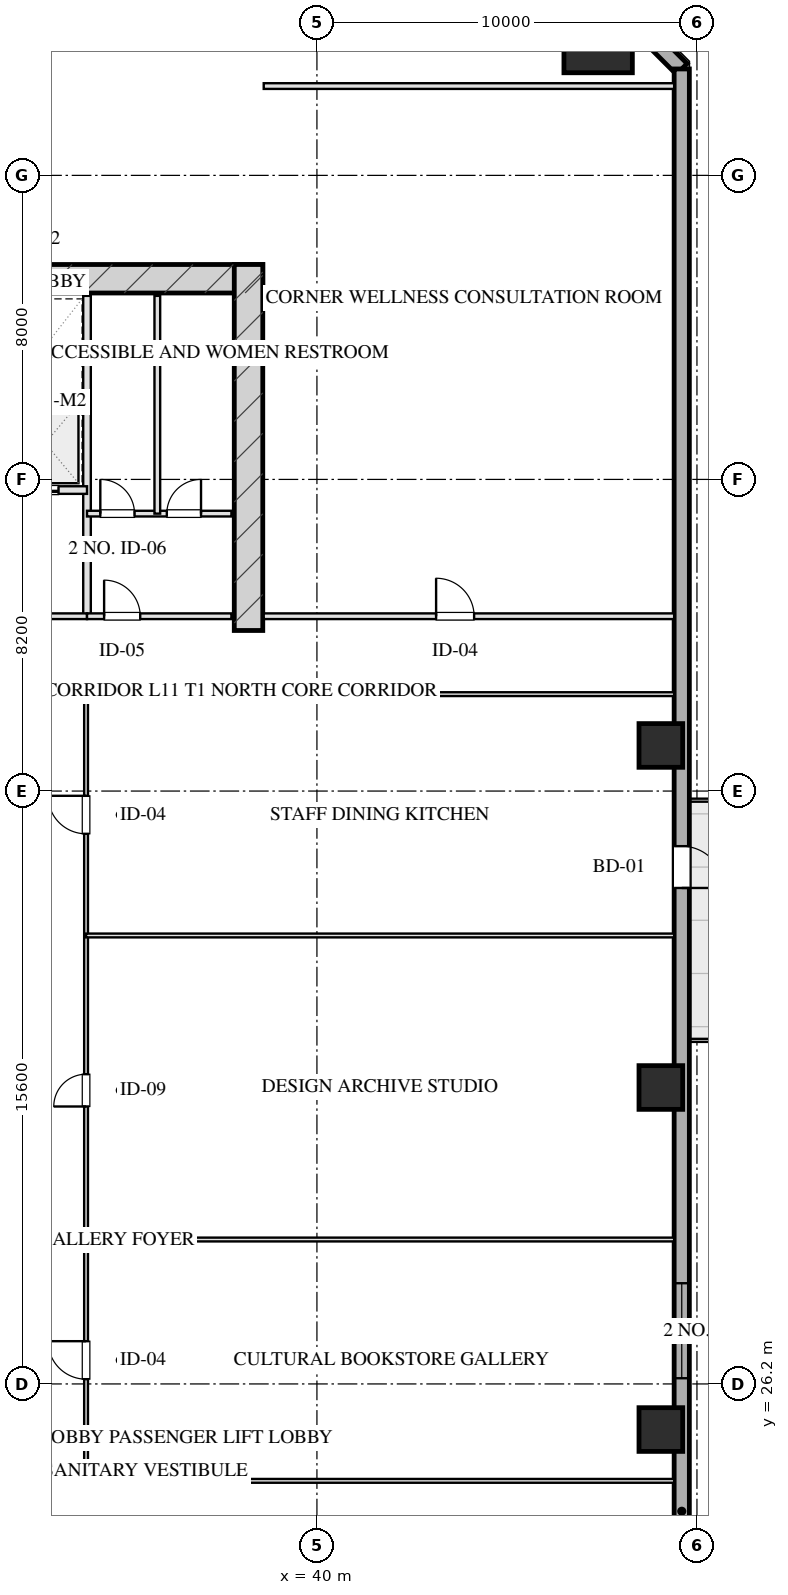
"""IFC4 building model, lengths in metres.
Left out: names, types, materials, properties, quantities, classifications, styles, units other than length and angle.
Written with IfcOpenShell. Run it as: python <this file> out.ifc"""

import sys

from ifc_helpers import new_model, si_unit, direction, frame, frame_2d, origin, origin_2d, place, context, subcontext, project, spatial, rectangle, hollow_rectangle, extrude, element, fill, save


model = new_model("IFC4")
c1 = context("Model", 3, precision=1e-05, world=origin(), true_north=direction((0.0, 1.0)))
c2 = subcontext(c1, "Body", "Model", "MODEL_VIEW")
j1 = project(units=[si_unit("LENGTHUNIT", "METRE"), si_unit("PLANEANGLEUNIT", "RADIAN")], contexts=[c1])
p1 = place(None, origin())
s1 = spatial("IfcSite", under=j1, at=p1, CompositionType="ELEMENT")
p2 = place(p1, origin())
s2 = spatial("IfcBuilding", under=s1, at=p2, CompositionType="ELEMENT")
p3 = place(p2, frame((0.0, 0.0, 50.6)))
s3 = spatial("IfcBuildingStorey", under=s2, at=p3, CompositionType="ELEMENT", Elevation=50.6)
p4 = place(p3, frame((21.425, 55.28, 0.0), z_axis=(0.0, 0.0, 1.0), x_axis=(1.0, 0.0, 0.0)))
e1 = element("IfcWall", 1, at=p4, inside=s3, PredefinedType="SHEAR", context=c2, shape_type="SweptSolid", body=[
    extrude(rectangle(XDim=17.15, YDim=0.75, at=frame_2d((8.575, 0.0))), origin(), (0.0, 0.0, 1.0), 3.45),
])
p5 = place(p3, frame((38.2, 46.025, 0.0), z_axis=(0.0, 0.0, 1.0), x_axis=(0.0, 1.0, 0.0)))
e2 = element("IfcWall", 2, at=p5, inside=s3, PredefinedType="SHEAR", context=c2, shape_type="SweptSolid", body=[
    extrude(rectangle(XDim=9.63, YDim=0.75, at=frame_2d((4.815, 0.0))), origin(), (0.0, 0.0, 1.0), 3.45),
])
p6 = place(p3, frame((47.4, 61.6, 0.0), z_axis=(0.0, 0.0, 1.0), x_axis=(1.0, 0.0, 0.0)))
e3 = element("IfcColumn", 3, at=p6, inside=s3, PredefinedType="COLUMN", context=c2, shape_type="SweptSolid", body=[
    extrude(hollow_rectangle(XDim=1.8, YDim=1.8, WallThickness=0.06, at=origin_2d()), origin(), (0.0, 0.0, 1.0), 3.451),
])
for number, where, z_axis, x_axis in (
    (4, (49.05, 25.0, 0.0), (0.0, 0.0, 1.0), (1.0, 0.0, 0.0)),
    (5, (49.05, 34.0, 0.0), (0.0, 0.0, 1.0), (1.0, 0.0, 0.0)),
    (6, (49.05, 43.0, 0.0), (0.0, 0.0, 1.0), (1.0, 0.0, 0.0)),
):
    element("IfcColumn", number, at=place(p3, frame(where, z_axis=z_axis, x_axis=x_axis)), inside=s3, PredefinedType="COLUMN", context=c2, shape_type="SweptSolid", body=[
        extrude(hollow_rectangle(XDim=1.15, YDim=1.15, WallThickness=0.04, at=origin_2d()), origin(), (0.0, 0.0, 1.0), 3.451),
    ])
p7 = place(p3, frame((46.6, 63.8, 0.0), z_axis=(0.0, 0.0, 1.0), x_axis=(0.707106781187, -0.707106781187, 0.0)))
e7 = element("IfcWall", 7, at=p7, inside=s3, PredefinedType="SOLIDWALL", context=c2, shape_type="SweptSolid", body=[
    extrude(rectangle(XDim=4.243, YDim=0.4, at=frame_2d((2.121, 0.0))), origin(), (0.0, 0.0, 1.0), 2.61),
])
p8 = place(p3, frame((49.6, 60.8, 0.0), z_axis=(0.0, 0.0, 1.0), x_axis=(0.0, -1.0, 0.0)))
e8 = element("IfcWall", 8, at=p8, inside=s3, PredefinedType="SOLIDWALL", context=c2, shape_type="SweptSolid", body=[
    extrude(rectangle(XDim=53.6, YDim=0.4, at=frame_2d((26.8, 0.0))), origin(), (0.0, 0.0, 1.0), 2.61),
])
p9 = place(p8, frame((31.95, 0.0, 0.75)))
e9 = element("IfcOpeningElement", 9, at=p9, cuts=e8, PredefinedType="OPENING", context=c2, shape_type="SweptSolid", body=[
    extrude(rectangle(XDim=2.5, YDim=1.46, at=frame_2d((1.25, 0.73))), frame((0.0, 0.21, 0.0), z_axis=(0.0, -1.0, 0.0), x_axis=(1.0, 0.0, 0.0)), (0.0, 0.0, 1.0), 0.42),
])
p10 = place(p8, frame((20.45, 0.0, 0.0)))
e10 = element("IfcOpeningElement", 10, at=p10, cuts=e8, PredefinedType="OPENING", context=c2, shape_type="SweptSolid", body=[
    extrude(rectangle(XDim=1.1, YDim=2.15, at=frame_2d((0.55, 1.075))), frame((0.0, 0.21, 0.0), z_axis=(0.0, -1.0, 0.0), x_axis=(1.0, 0.0, 0.0)), (0.0, 0.0, 1.0), 0.42),
])
p11 = place(p3, frame((33.95, 46.4, 0.0), z_axis=(0.0, 0.0, 1.0), x_axis=(0.0, 1.0, 0.0)))
e11 = element("IfcWall", 11, at=p11, inside=s3, PredefinedType="PARTITIONING", context=c2, shape_type="SweptSolid", body=[
    extrude(rectangle(XDim=8.43, YDim=0.2, at=frame_2d((4.215, 0.0))), origin(), (0.0, 0.0, 1.0), 3.175),
])
p12 = place(p3, frame((29.55, 46.4, 0.0), z_axis=(0.0, 0.0, 1.0), x_axis=(1.0, 0.0, 0.0)))
e12 = element("IfcWall", 12, at=p12, inside=s3, PredefinedType="PARTITIONING", context=c2, shape_type="SweptSolid", body=[
    extrude(rectangle(XDim=4.4, YDim=0.15, at=frame_2d((2.2, 0.0))), origin(), (0.0, 0.0, 1.0), 3.175),
])
p13 = place(p12, frame((1.45, 0.0, 0.0)))
e13 = element("IfcOpeningElement", 13, at=p13, cuts=e12, PredefinedType="OPENING", context=c2, shape_type="SweptSolid", body=[
    extrude(rectangle(XDim=1.5, YDim=2.05, at=frame_2d((0.75, 1.025))), frame((0.0, 0.085, 0.0), z_axis=(0.0, -1.0, 0.0), x_axis=(1.0, 0.0, 0.0)), (0.0, 0.0, 1.0), 0.17),
])
p14 = place(p3, frame((29.55, 49.72, 0.0), z_axis=(0.0, 0.0, 1.0), x_axis=(1.0, 0.0, 0.0)))
e14 = element("IfcWall", 14, at=p14, inside=s3, PredefinedType="PARTITIONING", context=c2, shape_type="SweptSolid", body=[
    extrude(rectangle(XDim=4.4, YDim=0.2, at=frame_2d((2.2, 0.0))), origin(), (0.0, 0.0, 1.0), 3.175),
])
p15 = place(p14, frame((0.45, 0.0, 0.0)))
e15 = element("IfcOpeningElement", 15, at=p15, cuts=e14, PredefinedType="OPENING", context=c2, shape_type="SweptSolid", body=[
    extrude(rectangle(XDim=1.1, YDim=2.05, at=frame_2d((0.55, 1.025))), frame((0.0, 0.11, 0.0), z_axis=(0.0, -1.0, 0.0), x_axis=(1.0, 0.0, 0.0)), (0.0, 0.0, 1.0), 0.22),
])
p16 = place(p14, frame((2.55, 0.0, 0.0)))
e16 = element("IfcOpeningElement", 16, at=p16, cuts=e14, PredefinedType="OPENING", context=c2, shape_type="SweptSolid", body=[
    extrude(rectangle(XDim=1.1, YDim=2.05, at=frame_2d((0.55, 1.025))), frame((0.0, 0.11, 0.0), z_axis=(0.0, -1.0, 0.0), x_axis=(1.0, 0.0, 0.0)), (0.0, 0.0, 1.0), 0.22),
])
p17 = place(p3, frame((29.55, 52.15, 0.0), z_axis=(0.0, 0.0, 1.0), x_axis=(1.0, 0.0, 0.0)))
e17 = element("IfcWall", 17, at=p17, inside=s3, PredefinedType="PARTITIONING", context=c2, shape_type="SweptSolid", body=[
    extrude(rectangle(XDim=4.4, YDim=0.2, at=frame_2d((2.2, 0.0))), origin(), (0.0, 0.0, 1.0), 3.175),
])
p18 = place(p3, frame((33.95, 46.4, 0.0), z_axis=(0.0, 0.0, 1.0), x_axis=(1.0, 0.0, 0.0)))
e18 = element("IfcWall", 18, at=p18, inside=s3, PredefinedType="PARTITIONING", context=c2, shape_type="SweptSolid", body=[
    extrude(rectangle(XDim=3.8, YDim=0.15, at=frame_2d((1.9, 0.0))), origin(), (0.0, 0.0, 1.0), 3.175),
])
p19 = place(p18, frame((0.45, 0.0, 0.0)))
e19 = element("IfcOpeningElement", 19, at=p19, cuts=e18, PredefinedType="OPENING", context=c2, shape_type="SweptSolid", body=[
    extrude(rectangle(XDim=0.95, YDim=2.05, at=frame_2d((0.475, 1.025))), frame((0.0, 0.085, 0.0), z_axis=(0.0, -1.0, 0.0), x_axis=(1.0, 0.0, 0.0)), (0.0, 0.0, 1.0), 0.17),
])
p20 = place(p3, frame((33.95, 49.1, 0.0), z_axis=(0.0, 0.0, 1.0), x_axis=(1.0, 0.0, 0.0)))
e20 = element("IfcWall", 20, at=p20, inside=s3, PredefinedType="PARTITIONING", context=c2, shape_type="SweptSolid", body=[
    extrude(rectangle(XDim=3.8, YDim=0.15, at=frame_2d((1.9, 0.0))), origin(), (0.0, 0.0, 1.0), 3.175),
])
p21 = place(p20, frame((0.35, 0.0, 0.0)))
e21 = element("IfcOpeningElement", 21, at=p21, cuts=e20, PredefinedType="OPENING", context=c2, shape_type="SweptSolid", body=[
    extrude(rectangle(XDim=0.9, YDim=2.05, at=frame_2d((0.45, 1.025))), frame((0.0, 0.085, 0.0), z_axis=(0.0, -1.0, 0.0), x_axis=(1.0, 0.0, 0.0)), (0.0, 0.0, 1.0), 0.17),
])
p22 = place(p20, frame((2.1, 0.0, 0.0)))
e22 = element("IfcOpeningElement", 22, at=p22, cuts=e20, PredefinedType="OPENING", context=c2, shape_type="SweptSolid", body=[
    extrude(rectangle(XDim=0.9, YDim=2.05, at=frame_2d((0.45, 1.025))), frame((0.0, 0.085, 0.0), z_axis=(0.0, -1.0, 0.0), x_axis=(1.0, 0.0, 0.0)), (0.0, 0.0, 1.0), 0.17),
])
p23 = place(p3, frame((35.8, 49.1, 0.0), z_axis=(0.0, 0.0, 1.0), x_axis=(0.0, 1.0, 0.0)))
e23 = element("IfcWall", 23, at=p23, inside=s3, PredefinedType="PARTITIONING", context=c2, shape_type="SweptSolid", body=[
    extrude(rectangle(XDim=5.73, YDim=0.15, at=frame_2d((2.865, 0.0))), origin(), (0.0, 0.0, 1.0), 3.175),
])
p24 = place(p3, frame((38.6, 60.35, 0.0), z_axis=(0.0, 0.0, 1.0), x_axis=(1.0, 0.0, 0.0)))
e24 = element("IfcWall", 24, at=p24, inside=s3, PredefinedType="PARTITIONING", context=c2, shape_type="SweptSolid", body=[
    extrude(rectangle(XDim=10.8, YDim=0.15, at=frame_2d((5.4, 0.0))), origin(), (0.0, 0.0, 1.0), 3.175),
])
p25 = place(p3, frame((38.6, 46.4, 0.0), z_axis=(0.0, 0.0, 1.0), x_axis=(1.0, 0.0, 0.0)))
e25 = element("IfcWall", 25, at=p25, inside=s3, PredefinedType="PARTITIONING", context=c2, shape_type="SweptSolid", body=[
    extrude(rectangle(XDim=10.8, YDim=0.15, at=frame_2d((5.4, 0.0))), origin(), (0.0, 0.0, 1.0), 3.175),
])
p26 = place(p25, frame((4.536, 0.0, 0.0)))
e26 = element("IfcOpeningElement", 26, at=p26, cuts=e25, PredefinedType="OPENING", context=c2, shape_type="SweptSolid", body=[
    extrude(rectangle(XDim=1.0, YDim=2.05, at=frame_2d((0.5, 1.025))), frame((0.0, 0.085, 0.0), z_axis=(0.0, -1.0, 0.0), x_axis=(1.0, 0.0, 0.0)), (0.0, 0.0, 1.0), 0.17),
])
for number, where, z_axis, x_axis in (
    (27, (33.925, 23.65, 0.0), (0.0, 0.0, 1.0), (1.0, 0.0, 0.0)),
    (28, (33.925, 44.35, 0.0), (0.0, 0.0, 1.0), (1.0, 0.0, 0.0)),
):
    element("IfcWall", number, at=place(p3, frame(where, z_axis=z_axis, x_axis=x_axis)), inside=s3, PredefinedType="MOVABLE", context=c2, shape_type="SweptSolid", body=[
        extrude(rectangle(XDim=15.475, YDim=0.1, at=frame_2d((7.737, 0.0))), origin(), (0.0, 0.0, 1.0), 3.175),
    ])
p27 = place(p3, frame((33.925, 23.65, 0.0), z_axis=(0.0, 0.0, 1.0), x_axis=(0.0, 1.0, 0.0)))
e29 = element("IfcWall", 29, at=p27, inside=s3, PredefinedType="MOVABLE", context=c2, shape_type="SweptSolid", body=[
    extrude(rectangle(XDim=20.7, YDim=0.1, at=frame_2d((10.35, 0.0))), origin(), (0.0, 0.0, 1.0), 3.175),
])
p28 = place(p27, frame((2.675, 0.0, 0.0)))
e30 = element("IfcOpeningElement", 30, at=p28, cuts=e29, PredefinedType="OPENING", context=c2, shape_type="SweptSolid", body=[
    extrude(rectangle(XDim=1.0, YDim=2.05, at=frame_2d((0.5, 1.025))), frame((0.0, 0.06, 0.0), z_axis=(0.0, -1.0, 0.0), x_axis=(1.0, 0.0, 0.0)), (0.0, 0.0, 1.0), 0.12),
])
p29 = place(p27, frame((9.85, 0.0, 0.0)))
e31 = element("IfcOpeningElement", 31, at=p29, cuts=e29, PredefinedType="OPENING", context=c2, shape_type="SweptSolid", body=[
    extrude(rectangle(XDim=0.85, YDim=2.05, at=frame_2d((0.425, 1.025))), frame((0.0, 0.06, 0.0), z_axis=(0.0, -1.0, 0.0), x_axis=(1.0, 0.0, 0.0)), (0.0, 0.0, 1.0), 0.12),
])
p30 = place(p27, frame((17.025, 0.0, 0.0)))
e32 = element("IfcOpeningElement", 32, at=p30, cuts=e29, PredefinedType="OPENING", context=c2, shape_type="SweptSolid", body=[
    extrude(rectangle(XDim=1.0, YDim=2.05, at=frame_2d((0.5, 1.025))), frame((0.0, 0.06, 0.0), z_axis=(0.0, -1.0, 0.0), x_axis=(1.0, 0.0, 0.0)), (0.0, 0.0, 1.0), 0.12),
])
for number, where, z_axis, x_axis in (
    (33, (33.925, 30.0, 0.0), (0.0, 0.0, 1.0), (1.0, 0.0, 0.0)),
    (34, (33.925, 38.0, 0.0), (0.0, 0.0, 1.0), (1.0, 0.0, 0.0)),
):
    element("IfcWall", number, at=place(p3, frame(where, z_axis=z_axis, x_axis=x_axis)), inside=s3, PredefinedType="MOVABLE", context=c2, shape_type="SweptSolid", body=[
        extrude(rectangle(XDim=15.475, YDim=0.1, at=frame_2d((7.737, 0.0))), origin(), (0.0, 0.0, 1.0), 3.175),
    ])
p31 = place(p9, origin())
e35 = element("IfcWindow", 35, at=p31, inside=s3, PartitioningType="TRIPLE_PANEL_VERTICAL", PredefinedType="WINDOW", context=c2, shape_type="SweptSolid", body=[
    extrude(rectangle(XDim=2.5, YDim=1.46, at=frame_2d((1.25, 0.73))), frame((0.0, 0.03, 0.0), z_axis=(0.0, -1.0, 0.0), x_axis=(1.0, 0.0, 0.0)), (0.0, 0.0, 1.0), 0.06),
])
fill(e9, e35)
p32 = place(p10, origin())
e36 = element("IfcDoor", 36, at=p32, inside=s3, OperationType="SINGLE_SWING_RIGHT", PredefinedType="DOOR", context=c2, shape_type="SweptSolid", body=[
    extrude(rectangle(XDim=1.1, YDim=2.15, at=frame_2d((0.55, 1.075))), frame((0.0, 0.025, 0.0), z_axis=(0.0, -1.0, 0.0), x_axis=(1.0, 0.0, 0.0)), (0.0, 0.0, 1.0), 0.05),
])
fill(e10, e36)
p33 = place(p16, origin())
e37 = element("IfcDoor", 37, at=p33, inside=s3, OperationType="DOUBLE_DOOR_SLIDING", PredefinedType="DOOR", context=c2, shape_type="SweptSolid", body=[
    extrude(rectangle(XDim=1.1, YDim=2.05, at=frame_2d((0.55, 1.025))), frame((0.0, 0.025, 0.0), z_axis=(0.0, -1.0, 0.0), x_axis=(1.0, 0.0, 0.0)), (0.0, 0.0, 1.0), 0.05),
])
fill(e16, e37)
p34 = place(p19, origin())
e38 = element("IfcDoor", 38, at=p34, inside=s3, OperationType="SINGLE_SWING_LEFT", PredefinedType="DOOR", context=c2, shape_type="SweptSolid", body=[
    extrude(rectangle(XDim=0.95, YDim=2.05, at=frame_2d((0.475, 1.025))), frame((0.0, 0.025, 0.0), z_axis=(0.0, -1.0, 0.0), x_axis=(1.0, 0.0, 0.0)), (0.0, 0.0, 1.0), 0.05),
])
fill(e19, e38)
p35 = place(p21, origin())
e39 = element("IfcDoor", 39, at=p35, inside=s3, OperationType="SINGLE_SWING_LEFT", PredefinedType="DOOR", context=c2, shape_type="SweptSolid", body=[
    extrude(rectangle(XDim=0.9, YDim=2.05, at=frame_2d((0.45, 1.025))), frame((0.0, 0.025, 0.0), z_axis=(0.0, -1.0, 0.0), x_axis=(1.0, 0.0, 0.0)), (0.0, 0.0, 1.0), 0.05),
])
fill(e21, e39)
p36 = place(p22, origin())
e40 = element("IfcDoor", 40, at=p36, inside=s3, OperationType="SINGLE_SWING_RIGHT", PredefinedType="DOOR", context=c2, shape_type="SweptSolid", body=[
    extrude(rectangle(XDim=0.9, YDim=2.05, at=frame_2d((0.45, 1.025))), frame((0.0, 0.025, 0.0), z_axis=(0.0, -1.0, 0.0), x_axis=(1.0, 0.0, 0.0)), (0.0, 0.0, 1.0), 0.05),
])
fill(e22, e40)
p37 = place(p26, origin())
e41 = element("IfcDoor", 41, at=p37, inside=s3, OperationType="SINGLE_SWING_LEFT", PredefinedType="DOOR", context=c2, shape_type="SweptSolid", body=[
    extrude(rectangle(XDim=1.0, YDim=2.05, at=frame_2d((0.5, 1.025))), frame((0.0, 0.025, 0.0), z_axis=(0.0, -1.0, 0.0), x_axis=(1.0, 0.0, 0.0)), (0.0, 0.0, 1.0), 0.05),
])
fill(e26, e41)
p38 = place(p28, origin())
e42 = element("IfcDoor", 42, at=p38, inside=s3, OperationType="SINGLE_SWING_RIGHT", PredefinedType="DOOR", context=c2, shape_type="SweptSolid", body=[
    extrude(rectangle(XDim=1.0, YDim=2.05, at=frame_2d((0.5, 1.025))), frame((0.0, 0.025, 0.0), z_axis=(0.0, -1.0, 0.0), x_axis=(1.0, 0.0, 0.0)), (0.0, 0.0, 1.0), 0.05),
])
fill(e30, e42)
p39 = place(p29, origin())
e43 = element("IfcDoor", 43, at=p39, inside=s3, OperationType="SINGLE_SWING_LEFT", PredefinedType="DOOR", context=c2, shape_type="SweptSolid", body=[
    extrude(rectangle(XDim=0.85, YDim=2.05, at=frame_2d((0.425, 1.025))), frame((0.0, 0.025, 0.0), z_axis=(0.0, -1.0, 0.0), x_axis=(1.0, 0.0, 0.0)), (0.0, 0.0, 1.0), 0.05),
])
fill(e31, e43)
p40 = place(p30, origin())
e44 = element("IfcDoor", 44, at=p40, inside=s3, OperationType="SINGLE_SWING_RIGHT", PredefinedType="DOOR", context=c2, shape_type="SweptSolid", body=[
    extrude(rectangle(XDim=1.0, YDim=2.05, at=frame_2d((0.5, 1.025))), frame((0.0, 0.025, 0.0), z_axis=(0.0, -1.0, 0.0), x_axis=(1.0, 0.0, 0.0)), (0.0, 0.0, 1.0), 0.05),
])
fill(e32, e44)
save(model, sys.argv[1])
